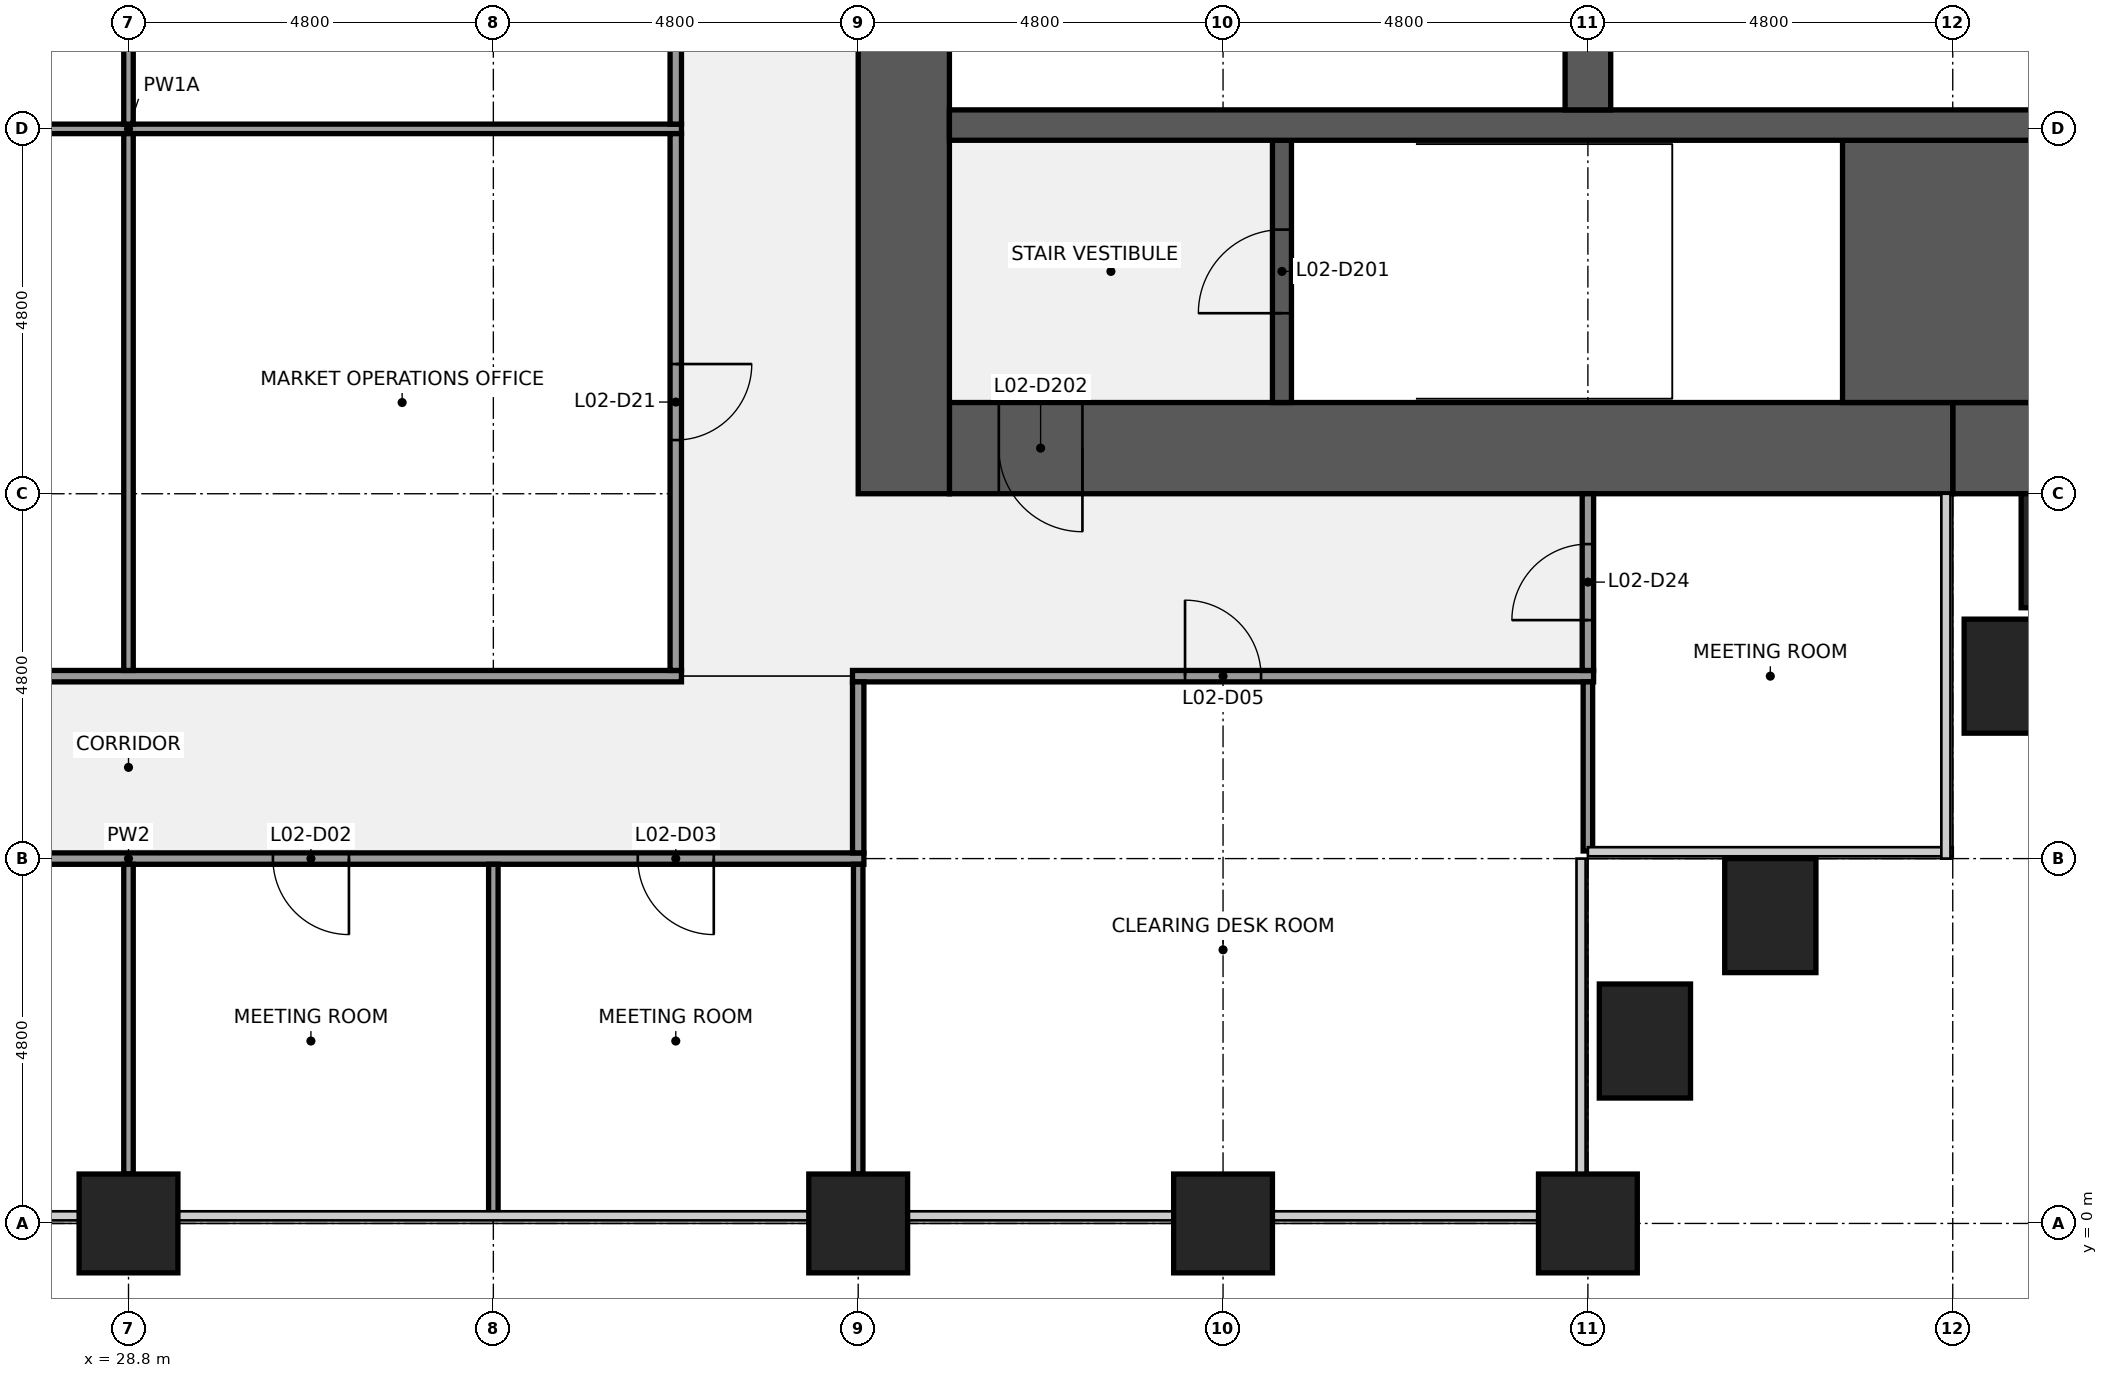
"""IFC4 building model, lengths in metres.
Left out: names, types, materials, properties, quantities, classifications, styles, units other than length and angle.
Written with IfcOpenShell. Run it as: python <this file> out.ifc"""

import sys

from ifc_helpers import new_model, si_unit, direction, frame, frame_2d, origin, origin_2d, place, context, subcontext, project, spatial, rectangle, extrude, element, fill, save


model = new_model("IFC4")
c1 = context("Model", 3, precision=1e-05, world=origin(), true_north=direction((0.0, 1.0)))
c2 = subcontext(c1, "Body", "Model", "MODEL_VIEW")
j1 = project(units=[si_unit("LENGTHUNIT", "METRE"), si_unit("PLANEANGLEUNIT", "RADIAN")], contexts=[c1])
p1 = place(None, origin())
s1 = spatial("IfcSite", under=j1, at=p1, CompositionType="ELEMENT")
p2 = place(p1, origin())
s2 = spatial("IfcBuilding", under=s1, at=p2, CompositionType="ELEMENT")
p3 = place(p2, frame((0.0, 0.0, 17.0)))
s3 = spatial("IfcBuildingStorey", under=s2, at=p3, CompositionType="ELEMENT", Elevation=17.0)
for number, where, z_axis, x_axis in (
    (1, (28.8, 0.0, 0.0), (0.0, 0.0, 1.0), (1.0, 0.0, 0.0)),
    (2, (38.4, 0.0, 0.0), (0.0, 0.0, 1.0), (1.0, 0.0, 0.0)),
    (3, (43.2, 0.0, 0.0), (0.0, 0.0, 1.0), (1.0, 0.0, 0.0)),
    (4, (48.0, 0.0, 0.0), (0.0, 0.0, 1.0), (1.0, 0.0, 0.0)),
):
    element("IfcColumn", number, at=place(p3, frame(where, z_axis=z_axis, x_axis=x_axis)), inside=s3, PredefinedType="COLUMN", context=c2, shape_type="SweptSolid", body=[
        extrude(rectangle(XDim=1.3, YDim=1.3, at=origin_2d()), origin(), (0.0, 0.0, 1.0), 4.4),
    ])
p4 = place(p3, frame((56.4, 10.2, 0.0), z_axis=(0.0, 0.0, 1.0), x_axis=(-1.0, 0.0, 0.0)))
e5 = element("IfcWall", 5, at=p4, inside=s3, PredefinedType="SHEAR", context=c2, shape_type="SweptSolid", body=[
    extrude(rectangle(XDim=3.6, YDim=1.2, at=frame_2d((1.8, 0.0))), origin(), (0.0, 0.0, 1.0), 4.24),
])
p5 = place(p3, frame((52.8, 10.2, 0.0), z_axis=(0.0, 0.0, 1.0), x_axis=(-1.0, 0.0, 0.0)))
e6 = element("IfcWall", 6, at=p5, inside=s3, PredefinedType="SHEAR", context=c2, shape_type="SweptSolid", body=[
    extrude(rectangle(XDim=13.2, YDim=1.2, at=frame_2d((6.6, 0.0))), origin(), (0.0, 0.0, 1.0), 4.24),
])
p6 = place(p5, frame((11.45, 0.0, 0.0)))
e7 = element("IfcOpeningElement", 7, at=p6, cuts=e6, PredefinedType="OPENING", context=c2, shape_type="SweptSolid", body=[
    extrude(rectangle(XDim=1.1, YDim=2.1, at=frame_2d((0.55, 1.05))), frame((0.0, 0.61, 0.0), z_axis=(0.0, -1.0, 0.0), x_axis=(1.0, 0.0, 0.0)), (0.0, 0.0, 1.0), 1.22),
])
p7 = place(p3, frame((39.0, 9.6, 0.0), z_axis=(0.0, 0.0, 1.0), x_axis=(0.0, 1.0, 0.0)))
e8 = element("IfcWall", 8, at=p7, inside=s3, PredefinedType="SHEAR", context=c2, shape_type="SweptSolid", body=[
    extrude(rectangle(XDim=28.8, YDim=1.2, at=frame_2d((14.4, 0.0))), origin(), (0.0, 0.0, 1.0), 4.24),
])
p8 = place(p7, frame((8.7, 0.0, 0.0)))
e9 = element("IfcOpeningElement", 9, at=p8, cuts=e8, PredefinedType="OPENING", context=c2, shape_type="SweptSolid", body=[
    extrude(rectangle(XDim=1.8, YDim=2.1, at=frame_2d((0.9, 1.05))), frame((0.0, 0.61, 0.0), z_axis=(0.0, -1.0, 0.0), x_axis=(1.0, 0.0, 0.0)), (0.0, 0.0, 1.0), 1.22),
])
p9 = place(p7, frame((18.3, 0.0, 0.0)))
e10 = element("IfcOpeningElement", 10, at=p9, cuts=e8, PredefinedType="OPENING", context=c2, shape_type="SweptSolid", body=[
    extrude(rectangle(XDim=1.8, YDim=2.1, at=frame_2d((0.9, 1.05))), frame((0.0, 0.61, 0.0), z_axis=(0.0, -1.0, 0.0), x_axis=(1.0, 0.0, 0.0)), (0.0, 0.0, 1.0), 1.22),
])
p10 = place(p3, frame((51.35, 12.525, 0.0), z_axis=(0.0, 0.0, 1.0), x_axis=(1.0, 0.0, 0.0)))
e11 = element("IfcWall", 11, at=p10, inside=s3, PredefinedType="SHEAR", context=c2, shape_type="SweptSolid", body=[
    extrude(rectangle(XDim=5.05, YDim=3.45, at=frame_2d((2.525, 0.0))), origin(), (0.0, 0.0, 1.0), 4.24),
])
p11 = place(p3, frame((43.975, 10.8, 0.0), z_axis=(0.0, 0.0, 1.0), x_axis=(0.0, 1.0, 0.0)))
e12 = element("IfcWall", 12, at=p11, inside=s3, PredefinedType="SHEAR", context=c2, shape_type="SweptSolid", body=[
    extrude(rectangle(XDim=3.45, YDim=0.25, at=frame_2d((1.725, 0.0))), origin(), (0.0, 0.0, 1.0), 4.24),
])
p12 = place(p11, frame((1.175, 0.0, 0.0)))
e13 = element("IfcOpeningElement", 13, at=p12, cuts=e12, PredefinedType="OPENING", context=c2, shape_type="SweptSolid", body=[
    extrude(rectangle(XDim=1.1, YDim=2.1, at=frame_2d((0.55, 1.05))), frame((0.0, 0.135, 0.0), z_axis=(0.0, -1.0, 0.0), x_axis=(1.0, 0.0, 0.0)), (0.0, 0.0, 1.0), 0.27),
])
p13 = place(p3, frame((39.6, 14.45, 0.0), z_axis=(0.0, 0.0, 1.0), x_axis=(1.0, 0.0, 0.0)))
e14 = element("IfcWall", 14, at=p13, inside=s3, PredefinedType="SHEAR", context=c2, shape_type="SweptSolid", body=[
    extrude(rectangle(XDim=16.8, YDim=0.4, at=frame_2d((8.4, 0.0))), origin(), (0.0, 0.0, 1.0), 4.24),
])
p14 = place(p3, frame((48.0, 14.65, 0.0), z_axis=(0.0, 0.0, 1.0), x_axis=(0.0, 1.0, 0.0)))
e15 = element("IfcWall", 15, at=p14, inside=s3, PredefinedType="SHEAR", context=c2, shape_type="SweptSolid", body=[
    extrude(rectangle(XDim=2.6, YDim=0.6, at=frame_2d((1.3, 0.0))), origin(), (0.0, 0.0, 1.0), 4.24),
])
p15 = place(p3, frame((19.125, 4.8, 0.0), z_axis=(0.0, 0.0, 1.0), x_axis=(1.0, 0.0, 0.0)))
e16 = element("IfcWall", 16, at=p15, inside=s3, PredefinedType="PARTITIONING", context=c2, shape_type="SweptSolid", body=[
    extrude(rectangle(XDim=19.35, YDim=0.15, at=frame_2d((9.675, 0.0))), origin(), (0.0, 0.0, 1.0), 3.25),
])
p16 = place(p15, frame((4.375, 0.0, 0.0)))
e17 = element("IfcOpeningElement", 17, at=p16, cuts=e16, PredefinedType="OPENING", context=c2, shape_type="SweptSolid", body=[
    extrude(rectangle(XDim=1.0, YDim=2.1, at=frame_2d((0.5, 1.05))), frame((0.0, 0.085, 0.0), z_axis=(0.0, -1.0, 0.0), x_axis=(1.0, 0.0, 0.0)), (0.0, 0.0, 1.0), 0.17),
])
p17 = place(p15, frame((11.575, 0.0, 0.0)))
e18 = element("IfcOpeningElement", 18, at=p17, cuts=e16, PredefinedType="OPENING", context=c2, shape_type="SweptSolid", body=[
    extrude(rectangle(XDim=1.0, YDim=2.1, at=frame_2d((0.5, 1.05))), frame((0.0, 0.085, 0.0), z_axis=(0.0, -1.0, 0.0), x_axis=(1.0, 0.0, 0.0)), (0.0, 0.0, 1.0), 0.17),
])
p18 = place(p15, frame((16.375, 0.0, 0.0)))
e19 = element("IfcOpeningElement", 19, at=p18, cuts=e16, PredefinedType="OPENING", context=c2, shape_type="SweptSolid", body=[
    extrude(rectangle(XDim=1.0, YDim=2.1, at=frame_2d((0.5, 1.05))), frame((0.0, 0.085, 0.0), z_axis=(0.0, -1.0, 0.0), x_axis=(1.0, 0.0, 0.0)), (0.0, 0.0, 1.0), 0.17),
])
p19 = place(p3, frame((21.525, 7.2, 0.0), z_axis=(0.0, 0.0, 1.0), x_axis=(1.0, 0.0, 0.0)))
e20 = element("IfcWall", 20, at=p19, inside=s3, PredefinedType="PARTITIONING", context=c2, shape_type="SweptSolid", body=[
    extrude(rectangle(XDim=14.55, YDim=0.15, at=frame_2d((7.275, 0.0))), origin(), (0.0, 0.0, 1.0), 3.25),
])
p20 = place(p3, frame((38.325, 7.2, 0.0), z_axis=(0.0, 0.0, 1.0), x_axis=(1.0, 0.0, 0.0)))
e21 = element("IfcWall", 21, at=p20, inside=s3, PredefinedType="PARTITIONING", context=c2, shape_type="SweptSolid", body=[
    extrude(rectangle(XDim=9.75, YDim=0.15, at=frame_2d((4.875, 0.0))), origin(), (0.0, 0.0, 1.0), 3.25),
])
p21 = place(p20, frame((4.375, 0.0, 0.0)))
e22 = element("IfcOpeningElement", 22, at=p21, cuts=e21, PredefinedType="OPENING", context=c2, shape_type="SweptSolid", body=[
    extrude(rectangle(XDim=1.0, YDim=2.1, at=frame_2d((0.5, 1.05))), frame((0.0, 0.085, 0.0), z_axis=(0.0, -1.0, 0.0), x_axis=(1.0, 0.0, 0.0)), (0.0, 0.0, 1.0), 0.17),
])
p22 = place(p3, frame((21.525, 14.4, 0.0), z_axis=(0.0, 0.0, 1.0), x_axis=(1.0, 0.0, 0.0)))
e23 = element("IfcWall", 23, at=p22, inside=s3, PredefinedType="PARTITIONING", context=c2, shape_type="SweptSolid", body=[
    extrude(rectangle(XDim=14.55, YDim=0.125, at=frame_2d((7.275, 0.0))), origin(), (0.0, 0.0, 1.0), 3.25),
])
p23 = place(p3, frame((28.8, 0.65, 0.0), z_axis=(0.0, 0.0, 1.0), x_axis=(0.0, 1.0, 0.0)))
e24 = element("IfcWall", 24, at=p23, inside=s3, PredefinedType="PARTITIONING", context=c2, shape_type="SweptSolid", body=[
    extrude(rectangle(XDim=4.075, YDim=0.125, at=frame_2d((2.038, 0.0))), origin(), (0.0, 0.0, 1.0), 3.25),
])
p24 = place(p3, frame((28.8, 7.275, 0.0), z_axis=(0.0, 0.0, 1.0), x_axis=(0.0, 1.0, 0.0)))
e25 = element("IfcWall", 25, at=p24, inside=s3, PredefinedType="PARTITIONING", context=c2, shape_type="SweptSolid", body=[
    extrude(rectangle(XDim=7.062, YDim=0.125, at=frame_2d((3.531, 0.0))), origin(), (0.0, 0.0, 1.0), 3.25),
])
p25 = place(p3, frame((28.8, 14.462, 0.0), z_axis=(0.0, 0.0, 1.0), x_axis=(0.0, 1.0, 0.0)))
e26 = element("IfcWall", 26, at=p25, inside=s3, PredefinedType="PARTITIONING", context=c2, shape_type="SweptSolid", body=[
    extrude(rectangle(XDim=9.475, YDim=0.125, at=frame_2d((4.738, 0.0))), origin(), (0.0, 0.0, 1.0), 3.25),
])
p26 = place(p3, frame((33.6, 0.1, 0.0), z_axis=(0.0, 0.0, 1.0), x_axis=(0.0, 1.0, 0.0)))
e27 = element("IfcWall", 27, at=p26, inside=s3, PredefinedType="PARTITIONING", context=c2, shape_type="SweptSolid", body=[
    extrude(rectangle(XDim=4.625, YDim=0.125, at=frame_2d((2.312, 0.0))), origin(), (0.0, 0.0, 1.0), 3.25),
])
p27 = place(p3, frame((36.0, 7.275, 0.0), z_axis=(0.0, 0.0, 1.0), x_axis=(0.0, 1.0, 0.0)))
e28 = element("IfcWall", 28, at=p27, inside=s3, PredefinedType="PARTITIONING", context=c2, shape_type="SweptSolid", body=[
    extrude(rectangle(XDim=7.062, YDim=0.15, at=frame_2d((3.531, 0.0))), origin(), (0.0, 0.0, 1.0), 3.25),
])
p28 = place(p27, frame((3.031, 0.0, 0.0)))
e29 = element("IfcOpeningElement", 29, at=p28, cuts=e28, PredefinedType="OPENING", context=c2, shape_type="SweptSolid", body=[
    extrude(rectangle(XDim=1.0, YDim=2.1, at=frame_2d((0.5, 1.05))), frame((0.0, 0.085, 0.0), z_axis=(0.0, -1.0, 0.0), x_axis=(1.0, 0.0, 0.0)), (0.0, 0.0, 1.0), 0.17),
])
p29 = place(p3, frame((36.0, 14.462, 0.0), z_axis=(0.0, 0.0, 1.0), x_axis=(0.0, 1.0, 0.0)))
e30 = element("IfcWall", 30, at=p29, inside=s3, PredefinedType="PARTITIONING", context=c2, shape_type="SweptSolid", body=[
    extrude(rectangle(XDim=9.475, YDim=0.15, at=frame_2d((4.738, 0.0))), origin(), (0.0, 0.0, 1.0), 3.25),
])
p30 = place(p29, frame((4.238, 0.0, 0.0)))
e31 = element("IfcOpeningElement", 31, at=p30, cuts=e30, PredefinedType="OPENING", context=c2, shape_type="SweptSolid", body=[
    extrude(rectangle(XDim=1.0, YDim=2.1, at=frame_2d((0.5, 1.05))), frame((0.0, 0.085, 0.0), z_axis=(0.0, -1.0, 0.0), x_axis=(1.0, 0.0, 0.0)), (0.0, 0.0, 1.0), 0.17),
])
p31 = place(p3, frame((38.4, 0.65, 0.0), z_axis=(0.0, 0.0, 1.0), x_axis=(0.0, 1.0, 0.0)))
e32 = element("IfcWall", 32, at=p31, inside=s3, PredefinedType="PARTITIONING", context=c2, shape_type="SweptSolid", body=[
    extrude(rectangle(XDim=4.075, YDim=0.125, at=frame_2d((2.038, 0.0))), origin(), (0.0, 0.0, 1.0), 3.25),
])
p32 = place(p3, frame((38.4, 4.875, 0.0), z_axis=(0.0, 0.0, 1.0), x_axis=(0.0, 1.0, 0.0)))
e33 = element("IfcWall", 33, at=p32, inside=s3, PredefinedType="PARTITIONING", context=c2, shape_type="SweptSolid", body=[
    extrude(rectangle(XDim=2.25, YDim=0.15, at=frame_2d((1.125, 0.0))), origin(), (0.0, 0.0, 1.0), 3.25),
])
p33 = place(p3, frame((48.0, 4.9, 0.0), z_axis=(0.0, 0.0, 1.0), x_axis=(0.0, 1.0, 0.0)))
e34 = element("IfcWall", 34, at=p33, inside=s3, PredefinedType="PARTITIONING", context=c2, shape_type="SweptSolid", body=[
    extrude(rectangle(XDim=2.225, YDim=0.125, at=frame_2d((1.113, 0.0))), origin(), (0.0, 0.0, 1.0), 3.25),
])
p34 = place(p3, frame((48.0, 7.275, 0.0), z_axis=(0.0, 0.0, 1.0), x_axis=(0.0, 1.0, 0.0)))
e35 = element("IfcWall", 35, at=p34, inside=s3, PredefinedType="PARTITIONING", context=c2, shape_type="SweptSolid", body=[
    extrude(rectangle(XDim=2.325, YDim=0.15, at=frame_2d((1.163, 0.0))), origin(), (0.0, 0.0, 1.0), 3.25),
])
p35 = place(p34, frame((0.663, 0.0, 0.0)))
e36 = element("IfcOpeningElement", 36, at=p35, cuts=e35, PredefinedType="OPENING", context=c2, shape_type="SweptSolid", body=[
    extrude(rectangle(XDim=1.0, YDim=2.1, at=frame_2d((0.5, 1.05))), frame((0.0, 0.085, 0.0), z_axis=(0.0, -1.0, 0.0), x_axis=(1.0, 0.0, 0.0)), (0.0, 0.0, 1.0), 0.17),
])
for number, where, z_axis, x_axis in (
    (37, (48.75, 2.4, 0.0), (0.0, 0.0, 1.0), (0.0, 1.0, 0.0)),
    (38, (50.4, 4.05, 0.0), (0.0, 0.0, 1.0), (1.0, 0.0, 0.0)),
    (39, (53.55, 7.2, 0.0), (0.0, 0.0, 1.0), (0.0, 1.0, 0.0)),
):
    element("IfcColumn", number, at=place(p3, frame(where, z_axis=z_axis, x_axis=x_axis)), inside=s3, PredefinedType="PILASTER", context=c2, shape_type="SweptSolid", body=[
        extrude(rectangle(XDim=1.2, YDim=1.5, at=origin_2d()), origin(), (0.0, 0.0, 1.0), 4.4),
    ])
p36 = place(p3, frame((55.2, 8.85, 0.0), z_axis=(0.0, 0.0, 1.0), x_axis=(1.0, 0.0, 0.0)))
e40 = element("IfcColumn", 40, at=p36, inside=s3, PredefinedType="PILASTER", context=c2, shape_type="SweptSolid", body=[
    extrude(rectangle(XDim=3.0, YDim=1.5, at=origin_2d()), origin(), (0.0, 0.0, 1.0), 4.4),
])
for number, where, z_axis, x_axis in (
    (41, (38.4, -1.075, 0.0), (0.0, 0.0, 1.0), (1.0, 0.0, 0.0)),
    (42, (43.2, -1.075, 0.0), (0.0, 0.0, 1.0), (1.0, 0.0, 0.0)),
    (43, (48.0, -1.075, 0.0), (0.0, 0.0, 1.0), (1.0, 0.0, 0.0)),
):
    element("IfcColumn", number, at=place(p3, frame(where, z_axis=z_axis, x_axis=x_axis)), inside=s3, PredefinedType="PILASTER", context=c2, shape_type="SweptSolid", body=[
        extrude(rectangle(XDim=4.2, YDim=0.85, at=origin_2d()), origin(), (0.0, 0.0, 1.0), 4.4),
    ])
p37 = place(p12, origin())
e44 = element("IfcDoor", 44, at=p37, inside=s3, OperationType="SINGLE_SWING_LEFT", PredefinedType="DOOR", context=c2, shape_type="SweptSolid", body=[
    extrude(rectangle(XDim=1.1, YDim=2.1, at=frame_2d((0.55, 1.05))), frame((0.0, 0.025, 0.0), z_axis=(0.0, -1.0, 0.0), x_axis=(1.0, 0.0, 0.0)), (0.0, 0.0, 1.0), 0.05),
])
fill(e13, e44)
p38 = place(p6, origin())
e45 = element("IfcDoor", 45, at=p38, inside=s3, OperationType="SINGLE_SWING_LEFT", PredefinedType="DOOR", context=c2, shape_type="SweptSolid", body=[
    extrude(rectangle(XDim=1.1, YDim=2.1, at=frame_2d((0.55, 1.05))), frame((0.0, 0.025, 0.0), z_axis=(0.0, -1.0, 0.0), x_axis=(1.0, 0.0, 0.0)), (0.0, 0.0, 1.0), 0.05),
])
fill(e7, e45)
p39 = place(p17, origin())
e46 = element("IfcDoor", 46, at=p39, inside=s3, OperationType="SINGLE_SWING_RIGHT", PredefinedType="DOOR", context=c2, shape_type="SweptSolid", body=[
    extrude(rectangle(XDim=1.0, YDim=2.1, at=frame_2d((0.5, 1.05))), frame((0.0, 0.025, 0.0), z_axis=(0.0, -1.0, 0.0), x_axis=(1.0, 0.0, 0.0)), (0.0, 0.0, 1.0), 0.05),
])
fill(e18, e46)
p40 = place(p18, origin())
e47 = element("IfcDoor", 47, at=p40, inside=s3, OperationType="SINGLE_SWING_RIGHT", PredefinedType="DOOR", context=c2, shape_type="SweptSolid", body=[
    extrude(rectangle(XDim=1.0, YDim=2.1, at=frame_2d((0.5, 1.05))), frame((0.0, 0.025, 0.0), z_axis=(0.0, -1.0, 0.0), x_axis=(1.0, 0.0, 0.0)), (0.0, 0.0, 1.0), 0.05),
])
fill(e19, e47)
p41 = place(p21, origin())
e48 = element("IfcDoor", 48, at=p41, inside=s3, OperationType="SINGLE_SWING_LEFT", PredefinedType="DOOR", context=c2, shape_type="SweptSolid", body=[
    extrude(rectangle(XDim=1.0, YDim=2.1, at=frame_2d((0.5, 1.05))), frame((0.0, 0.025, 0.0), z_axis=(0.0, -1.0, 0.0), x_axis=(1.0, 0.0, 0.0)), (0.0, 0.0, 1.0), 0.05),
])
fill(e22, e48)
p42 = place(p28, origin())
e49 = element("IfcDoor", 49, at=p42, inside=s3, OperationType="SINGLE_SWING_RIGHT", PredefinedType="DOOR", context=c2, shape_type="SweptSolid", body=[
    extrude(rectangle(XDim=1.0, YDim=2.1, at=frame_2d((0.5, 1.05))), frame((0.0, 0.025, 0.0), z_axis=(0.0, -1.0, 0.0), x_axis=(1.0, 0.0, 0.0)), (0.0, 0.0, 1.0), 0.05),
])
fill(e29, e49)
p43 = place(p35, origin())
e50 = element("IfcDoor", 50, at=p43, inside=s3, OperationType="SINGLE_SWING_LEFT", PredefinedType="DOOR", context=c2, shape_type="SweptSolid", body=[
    extrude(rectangle(XDim=1.0, YDim=2.1, at=frame_2d((0.5, 1.05))), frame((0.0, 0.025, 0.0), z_axis=(0.0, -1.0, 0.0), x_axis=(1.0, 0.0, 0.0)), (0.0, 0.0, 1.0), 0.05),
])
fill(e36, e50)
save(model, sys.argv[1])
